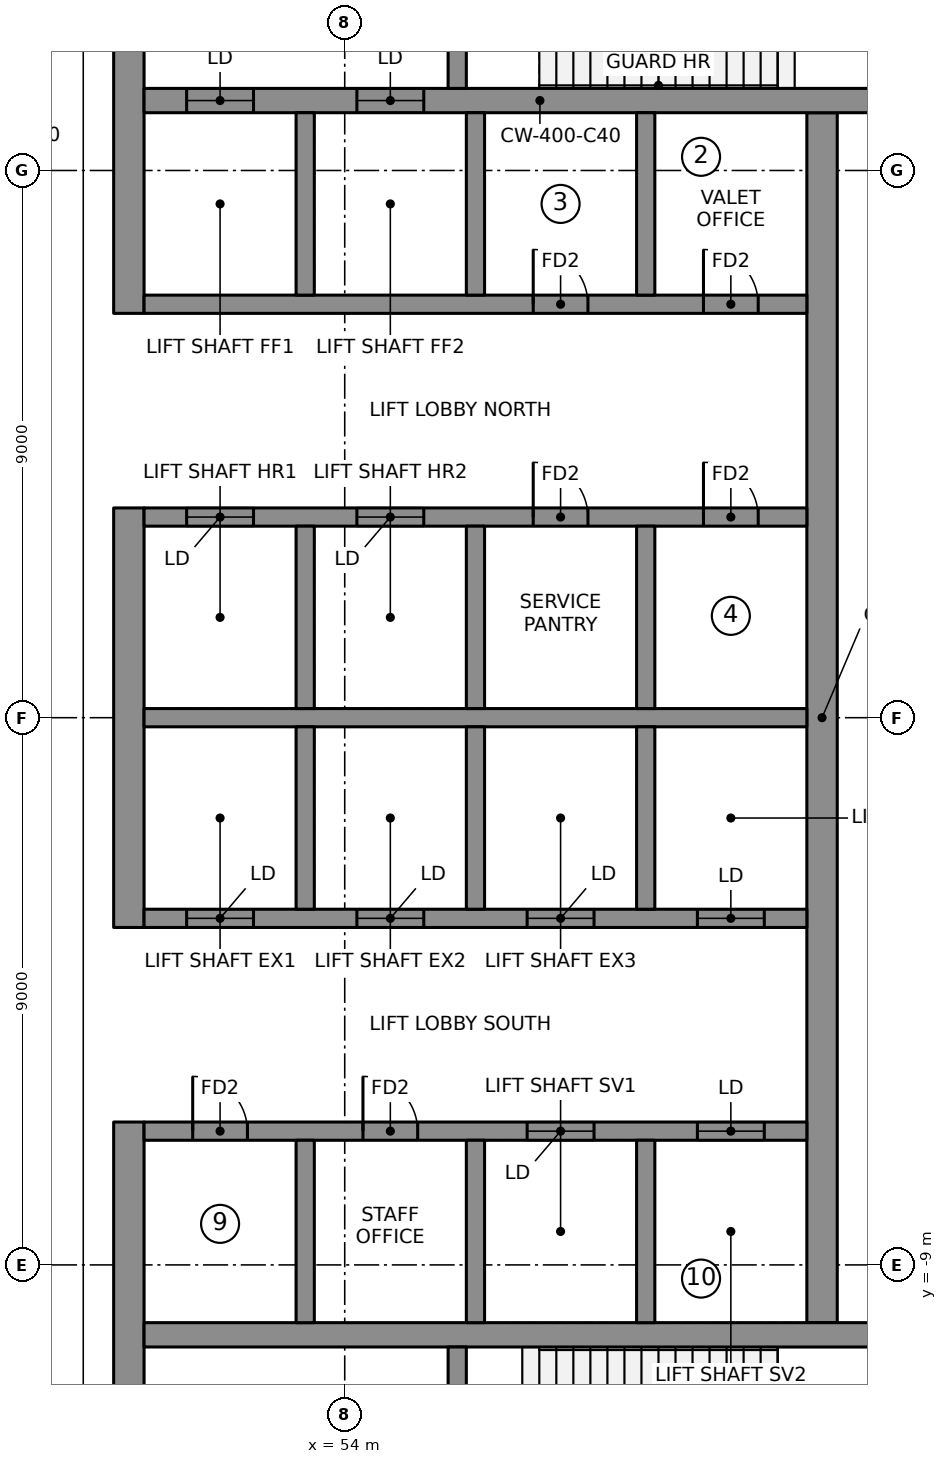
"""IFC4 building model, lengths in metres.
Left out: names, types, materials, properties, quantities, classifications, styles, units other than length and angle.
Written with IfcOpenShell. Run it as: python <this file> out.ifc"""

import sys

from ifc_helpers import new_model, si_unit, direction, frame, frame_2d, origin, place, context, subcontext, project, spatial, rectangle, extrude, element, fill, save


model = new_model("IFC4")
c1 = context("Model", 3, precision=1e-05, world=origin(), true_north=direction((0.0, 1.0)))
c2 = subcontext(c1, "Body", "Model", "MODEL_VIEW")
j1 = project(units=[si_unit("LENGTHUNIT", "METRE"), si_unit("PLANEANGLEUNIT", "RADIAN")], contexts=[c1])
p1 = place(None, origin())
s1 = spatial("IfcSite", under=j1, at=p1, CompositionType="ELEMENT")
p2 = place(p1, origin())
s2 = spatial("IfcBuilding", under=s1, at=p2, CompositionType="ELEMENT")
p3 = place(p2, frame((0.0, 0.0, 313.2)))
s3 = spatial("IfcBuildingStorey", under=s2, at=p3, CompositionType="ELEMENT", Elevation=313.2)
p4 = place(p3, frame((50.45, 6.65, 0.0), z_axis=(0.0, 0.0, 1.0), x_axis=(0.0, 1.0, 0.0)))
e1 = element("IfcWall", 1, at=p4, inside=s3, PredefinedType="SHEAR", context=c2, shape_type="SweptSolid", body=[
    extrude(rectangle(XDim=9.6, YDim=0.5, at=frame_2d((4.8, 0.0))), origin(), (0.0, 0.0, 1.0), 5.4),
])
p5 = place(p4, frame((6.5, 0.0, 0.0)))
e2 = element("IfcOpeningElement", 2, at=p5, cuts=e1, PredefinedType="OPENING", context=c2, shape_type="SweptSolid", body=[
    extrude(rectangle(XDim=1.1, YDim=2.1, at=frame_2d((0.55, 1.05))), frame((0.0, 0.26, 0.0), z_axis=(0.0, -1.0, 0.0), x_axis=(1.0, 0.0, 0.0)), (0.0, 0.0, 1.0), 0.52),
])
p6 = place(p3, frame((50.45, -3.45, 0.0), z_axis=(0.0, 0.0, 1.0), x_axis=(0.0, 1.0, 0.0)))
e3 = element("IfcWall", 3, at=p6, inside=s3, PredefinedType="SHEAR", context=c2, shape_type="SweptSolid", body=[
    extrude(rectangle(XDim=6.9, YDim=0.5, at=frame_2d((3.45, 0.0))), origin(), (0.0, 0.0, 1.0), 5.4),
])
p7 = place(p3, frame((50.45, -16.25, 0.0), z_axis=(0.0, 0.0, 1.0), x_axis=(0.0, 1.0, 0.0)))
e4 = element("IfcWall", 4, at=p7, inside=s3, PredefinedType="SHEAR", context=c2, shape_type="SweptSolid", body=[
    extrude(rectangle(XDim=9.6, YDim=0.5, at=frame_2d((4.8, 0.0))), origin(), (0.0, 0.0, 1.0), 5.4),
])
p8 = place(p7, frame((2.0, 0.0, 0.0)))
e5 = element("IfcOpeningElement", 5, at=p8, cuts=e4, PredefinedType="OPENING", context=c2, shape_type="SweptSolid", body=[
    extrude(rectangle(XDim=1.1, YDim=2.1, at=frame_2d((0.55, 1.05))), frame((0.0, 0.26, 0.0), z_axis=(0.0, -1.0, 0.0), x_axis=(1.0, 0.0, 0.0)), (0.0, 0.0, 1.0), 0.52),
])
p9 = place(p3, frame((61.85, -9.95, 0.0), z_axis=(0.0, 0.0, 1.0), x_axis=(0.0, 1.0, 0.0)))
e6 = element("IfcWall", 6, at=p9, inside=s3, PredefinedType="SHEAR", context=c2, shape_type="SweptSolid", body=[
    extrude(rectangle(XDim=19.9, YDim=0.5, at=frame_2d((9.95, 0.0))), origin(), (0.0, 0.0, 1.0), 5.4),
])
p10 = place(p3, frame((50.7, 10.15, 0.0), z_axis=(0.0, 0.0, 1.0), x_axis=(1.0, 0.0, 0.0)))
e7 = element("IfcWall", 7, at=p10, inside=s3, PredefinedType="SHEAR", context=c2, shape_type="SweptSolid", body=[
    extrude(rectangle(XDim=13.02, YDim=0.4, at=frame_2d((6.51, 0.0))), origin(), (0.0, 0.0, 1.0), 5.4),
])
p11 = place(p10, frame((0.7, 0.0, 0.0)))
e8 = element("IfcOpeningElement", 8, at=p11, cuts=e7, PredefinedType="OPENING", context=c2, shape_type="SweptSolid", body=[
    extrude(rectangle(XDim=1.1, YDim=2.1, at=frame_2d((0.55, 1.05))), frame((0.0, 0.21, 0.0), z_axis=(0.0, -1.0, 0.0), x_axis=(1.0, 0.0, 0.0)), (0.0, 0.0, 1.0), 0.42),
])
p12 = place(p10, frame((3.5, 0.0, 0.0)))
e9 = element("IfcOpeningElement", 9, at=p12, cuts=e7, PredefinedType="OPENING", context=c2, shape_type="SweptSolid", body=[
    extrude(rectangle(XDim=1.1, YDim=2.1, at=frame_2d((0.55, 1.05))), frame((0.0, 0.21, 0.0), z_axis=(0.0, -1.0, 0.0), x_axis=(1.0, 0.0, 0.0)), (0.0, 0.0, 1.0), 0.42),
])
p13 = place(p3, frame((50.7, -10.15, 0.0), z_axis=(0.0, 0.0, 1.0), x_axis=(1.0, 0.0, 0.0)))
e10 = element("IfcWall", 10, at=p13, inside=s3, PredefinedType="SHEAR", context=c2, shape_type="SweptSolid", body=[
    extrude(rectangle(XDim=13.02, YDim=0.4, at=frame_2d((6.51, 0.0))), origin(), (0.0, 0.0, 1.0), 5.4),
])
p14 = place(p3, frame((50.7, 0.0, 0.0), z_axis=(0.0, 0.0, 1.0), x_axis=(1.0, 0.0, 0.0)))
e11 = element("IfcWall", 11, at=p14, inside=s3, PredefinedType="SHEAR", context=c2, shape_type="SweptSolid", body=[
    extrude(rectangle(XDim=10.9, YDim=0.3, at=frame_2d((5.45, 0.0))), origin(), (0.0, 0.0, 1.0), 5.4),
])
p15 = place(p3, frame((50.7, 3.3, 0.0), z_axis=(0.0, 0.0, 1.0), x_axis=(1.0, 0.0, 0.0)))
e12 = element("IfcWall", 12, at=p15, inside=s3, PredefinedType="SHEAR", context=c2, shape_type="SweptSolid", body=[
    extrude(rectangle(XDim=10.9, YDim=0.3, at=frame_2d((5.45, 0.0))), origin(), (0.0, 0.0, 1.0), 5.4),
])
p16 = place(p15, frame((0.7, 0.0, 0.0)))
e13 = element("IfcOpeningElement", 13, at=p16, cuts=e12, PredefinedType="OPENING", context=c2, shape_type="SweptSolid", body=[
    extrude(rectangle(XDim=1.1, YDim=2.1, at=frame_2d((0.55, 1.05))), frame((0.0, 0.16, 0.0), z_axis=(0.0, -1.0, 0.0), x_axis=(1.0, 0.0, 0.0)), (0.0, 0.0, 1.0), 0.32),
])
p17 = place(p15, frame((3.5, 0.0, 0.0)))
e14 = element("IfcOpeningElement", 14, at=p17, cuts=e12, PredefinedType="OPENING", context=c2, shape_type="SweptSolid", body=[
    extrude(rectangle(XDim=1.1, YDim=2.1, at=frame_2d((0.55, 1.05))), frame((0.0, 0.16, 0.0), z_axis=(0.0, -1.0, 0.0), x_axis=(1.0, 0.0, 0.0)), (0.0, 0.0, 1.0), 0.32),
])
p18 = place(p15, frame((6.4, 0.0, 0.0)))
e15 = element("IfcOpeningElement", 15, at=p18, cuts=e12, PredefinedType="OPENING", context=c2, shape_type="SweptSolid", body=[
    extrude(rectangle(XDim=0.9, YDim=2.1, at=frame_2d((0.45, 1.05))), frame((0.0, 0.16, 0.0), z_axis=(0.0, -1.0, 0.0), x_axis=(1.0, 0.0, 0.0)), (0.0, 0.0, 1.0), 0.32),
])
p19 = place(p15, frame((9.2, 0.0, 0.0)))
e16 = element("IfcOpeningElement", 16, at=p19, cuts=e12, PredefinedType="OPENING", context=c2, shape_type="SweptSolid", body=[
    extrude(rectangle(XDim=0.9, YDim=2.1, at=frame_2d((0.45, 1.05))), frame((0.0, 0.16, 0.0), z_axis=(0.0, -1.0, 0.0), x_axis=(1.0, 0.0, 0.0)), (0.0, 0.0, 1.0), 0.32),
])
p20 = place(p3, frame((50.7, 6.8, 0.0), z_axis=(0.0, 0.0, 1.0), x_axis=(1.0, 0.0, 0.0)))
e17 = element("IfcWall", 17, at=p20, inside=s3, PredefinedType="SHEAR", context=c2, shape_type="SweptSolid", body=[
    extrude(rectangle(XDim=10.9, YDim=0.3, at=frame_2d((5.45, 0.0))), origin(), (0.0, 0.0, 1.0), 5.4),
])
p21 = place(p20, frame((6.4, 0.0, 0.0)))
e18 = element("IfcOpeningElement", 18, at=p21, cuts=e17, PredefinedType="OPENING", context=c2, shape_type="SweptSolid", body=[
    extrude(rectangle(XDim=0.9, YDim=2.1, at=frame_2d((0.45, 1.05))), frame((0.0, 0.16, 0.0), z_axis=(0.0, -1.0, 0.0), x_axis=(1.0, 0.0, 0.0)), (0.0, 0.0, 1.0), 0.32),
])
p22 = place(p20, frame((9.2, 0.0, 0.0)))
e19 = element("IfcOpeningElement", 19, at=p22, cuts=e17, PredefinedType="OPENING", context=c2, shape_type="SweptSolid", body=[
    extrude(rectangle(XDim=0.9, YDim=2.1, at=frame_2d((0.45, 1.05))), frame((0.0, 0.16, 0.0), z_axis=(0.0, -1.0, 0.0), x_axis=(1.0, 0.0, 0.0)), (0.0, 0.0, 1.0), 0.32),
])
for number, where, z_axis, x_axis in (
    (20, (53.35, 0.15, 0.0), (0.0, 0.0, 1.0), (0.0, 1.0, 0.0)),
    (21, (53.35, 6.95, 0.0), (0.0, 0.0, 1.0), (0.0, 1.0, 0.0)),
    (22, (56.15, 0.15, 0.0), (0.0, 0.0, 1.0), (0.0, 1.0, 0.0)),
    (23, (56.15, 6.95, 0.0), (0.0, 0.0, 1.0), (0.0, 1.0, 0.0)),
    (24, (58.95, 0.15, 0.0), (0.0, 0.0, 1.0), (0.0, 1.0, 0.0)),
    (25, (58.95, 6.95, 0.0), (0.0, 0.0, 1.0), (0.0, 1.0, 0.0)),
):
    element("IfcWall", number, at=place(p3, frame(where, z_axis=z_axis, x_axis=x_axis)), inside=s3, PredefinedType="SHEAR", context=c2, shape_type="SweptSolid", body=[
        extrude(rectangle(XDim=3.0, YDim=0.3, at=frame_2d((1.5, 0.0))), origin(), (0.0, 0.0, 1.0), 5.4),
    ])
p23 = place(p3, frame((50.7, -3.3, 0.0), z_axis=(0.0, 0.0, 1.0), x_axis=(1.0, 0.0, 0.0)))
e26 = element("IfcWall", 26, at=p23, inside=s3, PredefinedType="SHEAR", context=c2, shape_type="SweptSolid", body=[
    extrude(rectangle(XDim=10.9, YDim=0.3, at=frame_2d((5.45, 0.0))), origin(), (0.0, 0.0, 1.0), 5.4),
])
p24 = place(p23, frame((0.7, 0.0, 0.0)))
e27 = element("IfcOpeningElement", 27, at=p24, cuts=e26, PredefinedType="OPENING", context=c2, shape_type="SweptSolid", body=[
    extrude(rectangle(XDim=1.1, YDim=2.1, at=frame_2d((0.55, 1.05))), frame((0.0, 0.16, 0.0), z_axis=(0.0, -1.0, 0.0), x_axis=(1.0, 0.0, 0.0)), (0.0, 0.0, 1.0), 0.32),
])
p25 = place(p23, frame((3.5, 0.0, 0.0)))
e28 = element("IfcOpeningElement", 28, at=p25, cuts=e26, PredefinedType="OPENING", context=c2, shape_type="SweptSolid", body=[
    extrude(rectangle(XDim=1.1, YDim=2.1, at=frame_2d((0.55, 1.05))), frame((0.0, 0.16, 0.0), z_axis=(0.0, -1.0, 0.0), x_axis=(1.0, 0.0, 0.0)), (0.0, 0.0, 1.0), 0.32),
])
p26 = place(p23, frame((6.3, 0.0, 0.0)))
e29 = element("IfcOpeningElement", 29, at=p26, cuts=e26, PredefinedType="OPENING", context=c2, shape_type="SweptSolid", body=[
    extrude(rectangle(XDim=1.1, YDim=2.1, at=frame_2d((0.55, 1.05))), frame((0.0, 0.16, 0.0), z_axis=(0.0, -1.0, 0.0), x_axis=(1.0, 0.0, 0.0)), (0.0, 0.0, 1.0), 0.32),
])
p27 = place(p23, frame((9.1, 0.0, 0.0)))
e30 = element("IfcOpeningElement", 30, at=p27, cuts=e26, PredefinedType="OPENING", context=c2, shape_type="SweptSolid", body=[
    extrude(rectangle(XDim=1.1, YDim=2.1, at=frame_2d((0.55, 1.05))), frame((0.0, 0.16, 0.0), z_axis=(0.0, -1.0, 0.0), x_axis=(1.0, 0.0, 0.0)), (0.0, 0.0, 1.0), 0.32),
])
p28 = place(p3, frame((50.7, -6.8, 0.0), z_axis=(0.0, 0.0, 1.0), x_axis=(1.0, 0.0, 0.0)))
e31 = element("IfcWall", 31, at=p28, inside=s3, PredefinedType="SHEAR", context=c2, shape_type="SweptSolid", body=[
    extrude(rectangle(XDim=10.9, YDim=0.3, at=frame_2d((5.45, 0.0))), origin(), (0.0, 0.0, 1.0), 5.4),
])
p29 = place(p28, frame((6.3, 0.0, 0.0)))
e32 = element("IfcOpeningElement", 32, at=p29, cuts=e31, PredefinedType="OPENING", context=c2, shape_type="SweptSolid", body=[
    extrude(rectangle(XDim=1.1, YDim=2.1, at=frame_2d((0.55, 1.05))), frame((0.0, 0.16, 0.0), z_axis=(0.0, -1.0, 0.0), x_axis=(1.0, 0.0, 0.0)), (0.0, 0.0, 1.0), 0.32),
])
p30 = place(p28, frame((9.1, 0.0, 0.0)))
e33 = element("IfcOpeningElement", 33, at=p30, cuts=e31, PredefinedType="OPENING", context=c2, shape_type="SweptSolid", body=[
    extrude(rectangle(XDim=1.1, YDim=2.1, at=frame_2d((0.55, 1.05))), frame((0.0, 0.16, 0.0), z_axis=(0.0, -1.0, 0.0), x_axis=(1.0, 0.0, 0.0)), (0.0, 0.0, 1.0), 0.32),
])
p31 = place(p28, frame((0.8, 0.0, 0.0)))
e34 = element("IfcOpeningElement", 34, at=p31, cuts=e31, PredefinedType="OPENING", context=c2, shape_type="SweptSolid", body=[
    extrude(rectangle(XDim=0.9, YDim=2.1, at=frame_2d((0.45, 1.05))), frame((0.0, 0.16, 0.0), z_axis=(0.0, -1.0, 0.0), x_axis=(1.0, 0.0, 0.0)), (0.0, 0.0, 1.0), 0.32),
])
p32 = place(p28, frame((3.6, 0.0, 0.0)))
e35 = element("IfcOpeningElement", 35, at=p32, cuts=e31, PredefinedType="OPENING", context=c2, shape_type="SweptSolid", body=[
    extrude(rectangle(XDim=0.9, YDim=2.1, at=frame_2d((0.45, 1.05))), frame((0.0, 0.16, 0.0), z_axis=(0.0, -1.0, 0.0), x_axis=(1.0, 0.0, 0.0)), (0.0, 0.0, 1.0), 0.32),
])
for number, where, z_axis, x_axis in (
    (36, (53.35, -3.15, 0.0), (0.0, 0.0, 1.0), (0.0, 1.0, 0.0)),
    (37, (53.35, -9.95, 0.0), (0.0, 0.0, 1.0), (0.0, 1.0, 0.0)),
    (38, (56.15, -3.15, 0.0), (0.0, 0.0, 1.0), (0.0, 1.0, 0.0)),
    (39, (56.15, -9.95, 0.0), (0.0, 0.0, 1.0), (0.0, 1.0, 0.0)),
    (40, (58.95, -3.15, 0.0), (0.0, 0.0, 1.0), (0.0, 1.0, 0.0)),
    (41, (58.95, -9.95, 0.0), (0.0, 0.0, 1.0), (0.0, 1.0, 0.0)),
):
    element("IfcWall", number, at=place(p3, frame(where, z_axis=z_axis, x_axis=x_axis)), inside=s3, PredefinedType="SHEAR", context=c2, shape_type="SweptSolid", body=[
        extrude(rectangle(XDim=3.0, YDim=0.3, at=frame_2d((1.5, 0.0))), origin(), (0.0, 0.0, 1.0), 5.4),
    ])
p33 = place(p3, frame((55.85, 10.35, 0.0), z_axis=(0.0, 0.0, 1.0), x_axis=(0.0, 1.0, 0.0)))
e42 = element("IfcWall", 42, at=p33, inside=s3, PredefinedType="SHEAR", context=c2, shape_type="SweptSolid", body=[
    extrude(rectangle(XDim=5.4, YDim=0.3, at=frame_2d((2.7, 0.0))), origin(), (0.0, 0.0, 1.0), 5.4),
])
p34 = place(p33, frame((1.43, 0.0, 0.0)))
e43 = element("IfcOpeningElement", 43, at=p34, cuts=e42, PredefinedType="OPENING", context=c2, shape_type="SweptSolid", body=[
    extrude(rectangle(XDim=1.1, YDim=2.1, at=frame_2d((0.55, 1.05))), frame((0.0, 0.16, 0.0), z_axis=(0.0, -1.0, 0.0), x_axis=(1.0, 0.0, 0.0)), (0.0, 0.0, 1.0), 0.32),
])
p35 = place(p33, frame((3.6, 0.0, 0.0)))
e44 = element("IfcOpeningElement", 44, at=p35, cuts=e42, PredefinedType="OPENING", context=c2, shape_type="SweptSolid", body=[
    extrude(rectangle(XDim=1.1, YDim=2.1, at=frame_2d((0.55, 1.05))), frame((0.0, 0.16, 0.0), z_axis=(0.0, -1.0, 0.0), x_axis=(1.0, 0.0, 0.0)), (0.0, 0.0, 1.0), 0.32),
])
p36 = place(p3, frame((55.85, -15.75, 0.0), z_axis=(0.0, 0.0, 1.0), x_axis=(0.0, 1.0, 0.0)))
e45 = element("IfcWall", 45, at=p36, inside=s3, PredefinedType="SHEAR", context=c2, shape_type="SweptSolid", body=[
    extrude(rectangle(XDim=5.4, YDim=0.3, at=frame_2d((2.7, 0.0))), origin(), (0.0, 0.0, 1.0), 5.4),
])
p37 = place(p36, frame((3.6, 0.0, 0.0)))
e46 = element("IfcOpeningElement", 46, at=p37, cuts=e45, PredefinedType="OPENING", context=c2, shape_type="SweptSolid", body=[
    extrude(rectangle(XDim=1.1, YDim=2.1, at=frame_2d((0.55, 1.05))), frame((0.0, 0.16, 0.0), z_axis=(0.0, -1.0, 0.0), x_axis=(1.0, 0.0, 0.0)), (0.0, 0.0, 1.0), 0.32),
])
p38 = place(p36, frame((0.8, 0.0, 0.0)))
e47 = element("IfcOpeningElement", 47, at=p38, cuts=e45, PredefinedType="OPENING", context=c2, shape_type="SweptSolid", body=[
    extrude(rectangle(XDim=0.9, YDim=2.1, at=frame_2d((0.45, 1.05))), frame((0.0, 0.16, 0.0), z_axis=(0.0, -1.0, 0.0), x_axis=(1.0, 0.0, 0.0)), (0.0, 0.0, 1.0), 0.32),
])
p39 = place(p11, origin())
e48 = element("IfcDoor", 48, at=p39, inside=s3, OperationType="DOUBLE_DOOR_SLIDING", PredefinedType="DOOR", context=c2, shape_type="SweptSolid", body=[
    extrude(rectangle(XDim=1.1, YDim=2.1, at=frame_2d((0.55, 1.05))), frame((0.0, 0.025, 0.0), z_axis=(0.0, -1.0, 0.0), x_axis=(1.0, 0.0, 0.0)), (0.0, 0.0, 1.0), 0.05),
])
fill(e8, e48)
p40 = place(p12, origin())
e49 = element("IfcDoor", 49, at=p40, inside=s3, OperationType="DOUBLE_DOOR_SLIDING", PredefinedType="DOOR", context=c2, shape_type="SweptSolid", body=[
    extrude(rectangle(XDim=1.1, YDim=2.1, at=frame_2d((0.55, 1.05))), frame((0.0, 0.025, 0.0), z_axis=(0.0, -1.0, 0.0), x_axis=(1.0, 0.0, 0.0)), (0.0, 0.0, 1.0), 0.05),
])
fill(e9, e49)
p41 = place(p16, origin())
e50 = element("IfcDoor", 50, at=p41, inside=s3, OperationType="DOUBLE_DOOR_SLIDING", PredefinedType="DOOR", context=c2, shape_type="SweptSolid", body=[
    extrude(rectangle(XDim=1.1, YDim=2.1, at=frame_2d((0.55, 1.05))), frame((0.0, 0.025, 0.0), z_axis=(0.0, -1.0, 0.0), x_axis=(1.0, 0.0, 0.0)), (0.0, 0.0, 1.0), 0.05),
])
fill(e13, e50)
p42 = place(p17, origin())
e51 = element("IfcDoor", 51, at=p42, inside=s3, OperationType="DOUBLE_DOOR_SLIDING", PredefinedType="DOOR", context=c2, shape_type="SweptSolid", body=[
    extrude(rectangle(XDim=1.1, YDim=2.1, at=frame_2d((0.55, 1.05))), frame((0.0, 0.025, 0.0), z_axis=(0.0, -1.0, 0.0), x_axis=(1.0, 0.0, 0.0)), (0.0, 0.0, 1.0), 0.05),
])
fill(e14, e51)
p43 = place(p24, origin())
e52 = element("IfcDoor", 52, at=p43, inside=s3, OperationType="DOUBLE_DOOR_SLIDING", PredefinedType="DOOR", context=c2, shape_type="SweptSolid", body=[
    extrude(rectangle(XDim=1.1, YDim=2.1, at=frame_2d((0.55, 1.05))), frame((0.0, 0.025, 0.0), z_axis=(0.0, -1.0, 0.0), x_axis=(1.0, 0.0, 0.0)), (0.0, 0.0, 1.0), 0.05),
])
fill(e27, e52)
p44 = place(p25, origin())
e53 = element("IfcDoor", 53, at=p44, inside=s3, OperationType="DOUBLE_DOOR_SLIDING", PredefinedType="DOOR", context=c2, shape_type="SweptSolid", body=[
    extrude(rectangle(XDim=1.1, YDim=2.1, at=frame_2d((0.55, 1.05))), frame((0.0, 0.025, 0.0), z_axis=(0.0, -1.0, 0.0), x_axis=(1.0, 0.0, 0.0)), (0.0, 0.0, 1.0), 0.05),
])
fill(e28, e53)
p45 = place(p26, origin())
e54 = element("IfcDoor", 54, at=p45, inside=s3, OperationType="DOUBLE_DOOR_SLIDING", PredefinedType="DOOR", context=c2, shape_type="SweptSolid", body=[
    extrude(rectangle(XDim=1.1, YDim=2.1, at=frame_2d((0.55, 1.05))), frame((0.0, 0.025, 0.0), z_axis=(0.0, -1.0, 0.0), x_axis=(1.0, 0.0, 0.0)), (0.0, 0.0, 1.0), 0.05),
])
fill(e29, e54)
p46 = place(p27, origin())
e55 = element("IfcDoor", 55, at=p46, inside=s3, OperationType="DOUBLE_DOOR_SLIDING", PredefinedType="DOOR", context=c2, shape_type="SweptSolid", body=[
    extrude(rectangle(XDim=1.1, YDim=2.1, at=frame_2d((0.55, 1.05))), frame((0.0, 0.025, 0.0), z_axis=(0.0, -1.0, 0.0), x_axis=(1.0, 0.0, 0.0)), (0.0, 0.0, 1.0), 0.05),
])
fill(e30, e55)
p47 = place(p29, origin())
e56 = element("IfcDoor", 56, at=p47, inside=s3, OperationType="DOUBLE_DOOR_SLIDING", PredefinedType="DOOR", context=c2, shape_type="SweptSolid", body=[
    extrude(rectangle(XDim=1.1, YDim=2.1, at=frame_2d((0.55, 1.05))), frame((0.0, 0.025, 0.0), z_axis=(0.0, -1.0, 0.0), x_axis=(1.0, 0.0, 0.0)), (0.0, 0.0, 1.0), 0.05),
])
fill(e32, e56)
p48 = place(p30, origin())
e57 = element("IfcDoor", 57, at=p48, inside=s3, OperationType="DOUBLE_DOOR_SLIDING", PredefinedType="DOOR", context=c2, shape_type="SweptSolid", body=[
    extrude(rectangle(XDim=1.1, YDim=2.1, at=frame_2d((0.55, 1.05))), frame((0.0, 0.025, 0.0), z_axis=(0.0, -1.0, 0.0), x_axis=(1.0, 0.0, 0.0)), (0.0, 0.0, 1.0), 0.05),
])
fill(e33, e57)
p49 = place(p21, origin())
e58 = element("IfcDoor", 58, at=p49, inside=s3, OperationType="SINGLE_SWING_LEFT", PredefinedType="DOOR", context=c2, shape_type="SweptSolid", body=[
    extrude(rectangle(XDim=0.9, YDim=2.1, at=frame_2d((0.45, 1.05))), frame((0.0, 0.025, 0.0), z_axis=(0.0, -1.0, 0.0), x_axis=(1.0, 0.0, 0.0)), (0.0, 0.0, 1.0), 0.05),
])
fill(e18, e58)
p50 = place(p22, origin())
e59 = element("IfcDoor", 59, at=p50, inside=s3, OperationType="SINGLE_SWING_LEFT", PredefinedType="DOOR", context=c2, shape_type="SweptSolid", body=[
    extrude(rectangle(XDim=0.9, YDim=2.1, at=frame_2d((0.45, 1.05))), frame((0.0, 0.025, 0.0), z_axis=(0.0, -1.0, 0.0), x_axis=(1.0, 0.0, 0.0)), (0.0, 0.0, 1.0), 0.05),
])
fill(e19, e59)
p51 = place(p18, origin())
e60 = element("IfcDoor", 60, at=p51, inside=s3, OperationType="SINGLE_SWING_LEFT", PredefinedType="DOOR", context=c2, shape_type="SweptSolid", body=[
    extrude(rectangle(XDim=0.9, YDim=2.1, at=frame_2d((0.45, 1.05))), frame((0.0, 0.025, 0.0), z_axis=(0.0, -1.0, 0.0), x_axis=(1.0, 0.0, 0.0)), (0.0, 0.0, 1.0), 0.05),
])
fill(e15, e60)
p52 = place(p19, origin())
e61 = element("IfcDoor", 61, at=p52, inside=s3, OperationType="SINGLE_SWING_LEFT", PredefinedType="DOOR", context=c2, shape_type="SweptSolid", body=[
    extrude(rectangle(XDim=0.9, YDim=2.1, at=frame_2d((0.45, 1.05))), frame((0.0, 0.025, 0.0), z_axis=(0.0, -1.0, 0.0), x_axis=(1.0, 0.0, 0.0)), (0.0, 0.0, 1.0), 0.05),
])
fill(e16, e61)
p53 = place(p31, origin())
e62 = element("IfcDoor", 62, at=p53, inside=s3, OperationType="SINGLE_SWING_LEFT", PredefinedType="DOOR", context=c2, shape_type="SweptSolid", body=[
    extrude(rectangle(XDim=0.9, YDim=2.1, at=frame_2d((0.45, 1.05))), frame((0.0, 0.025, 0.0), z_axis=(0.0, -1.0, 0.0), x_axis=(1.0, 0.0, 0.0)), (0.0, 0.0, 1.0), 0.05),
])
fill(e34, e62)
p54 = place(p32, origin())
e63 = element("IfcDoor", 63, at=p54, inside=s3, OperationType="SINGLE_SWING_LEFT", PredefinedType="DOOR", context=c2, shape_type="SweptSolid", body=[
    extrude(rectangle(XDim=0.9, YDim=2.1, at=frame_2d((0.45, 1.05))), frame((0.0, 0.025, 0.0), z_axis=(0.0, -1.0, 0.0), x_axis=(1.0, 0.0, 0.0)), (0.0, 0.0, 1.0), 0.05),
])
fill(e35, e63)
save(model, sys.argv[1])
